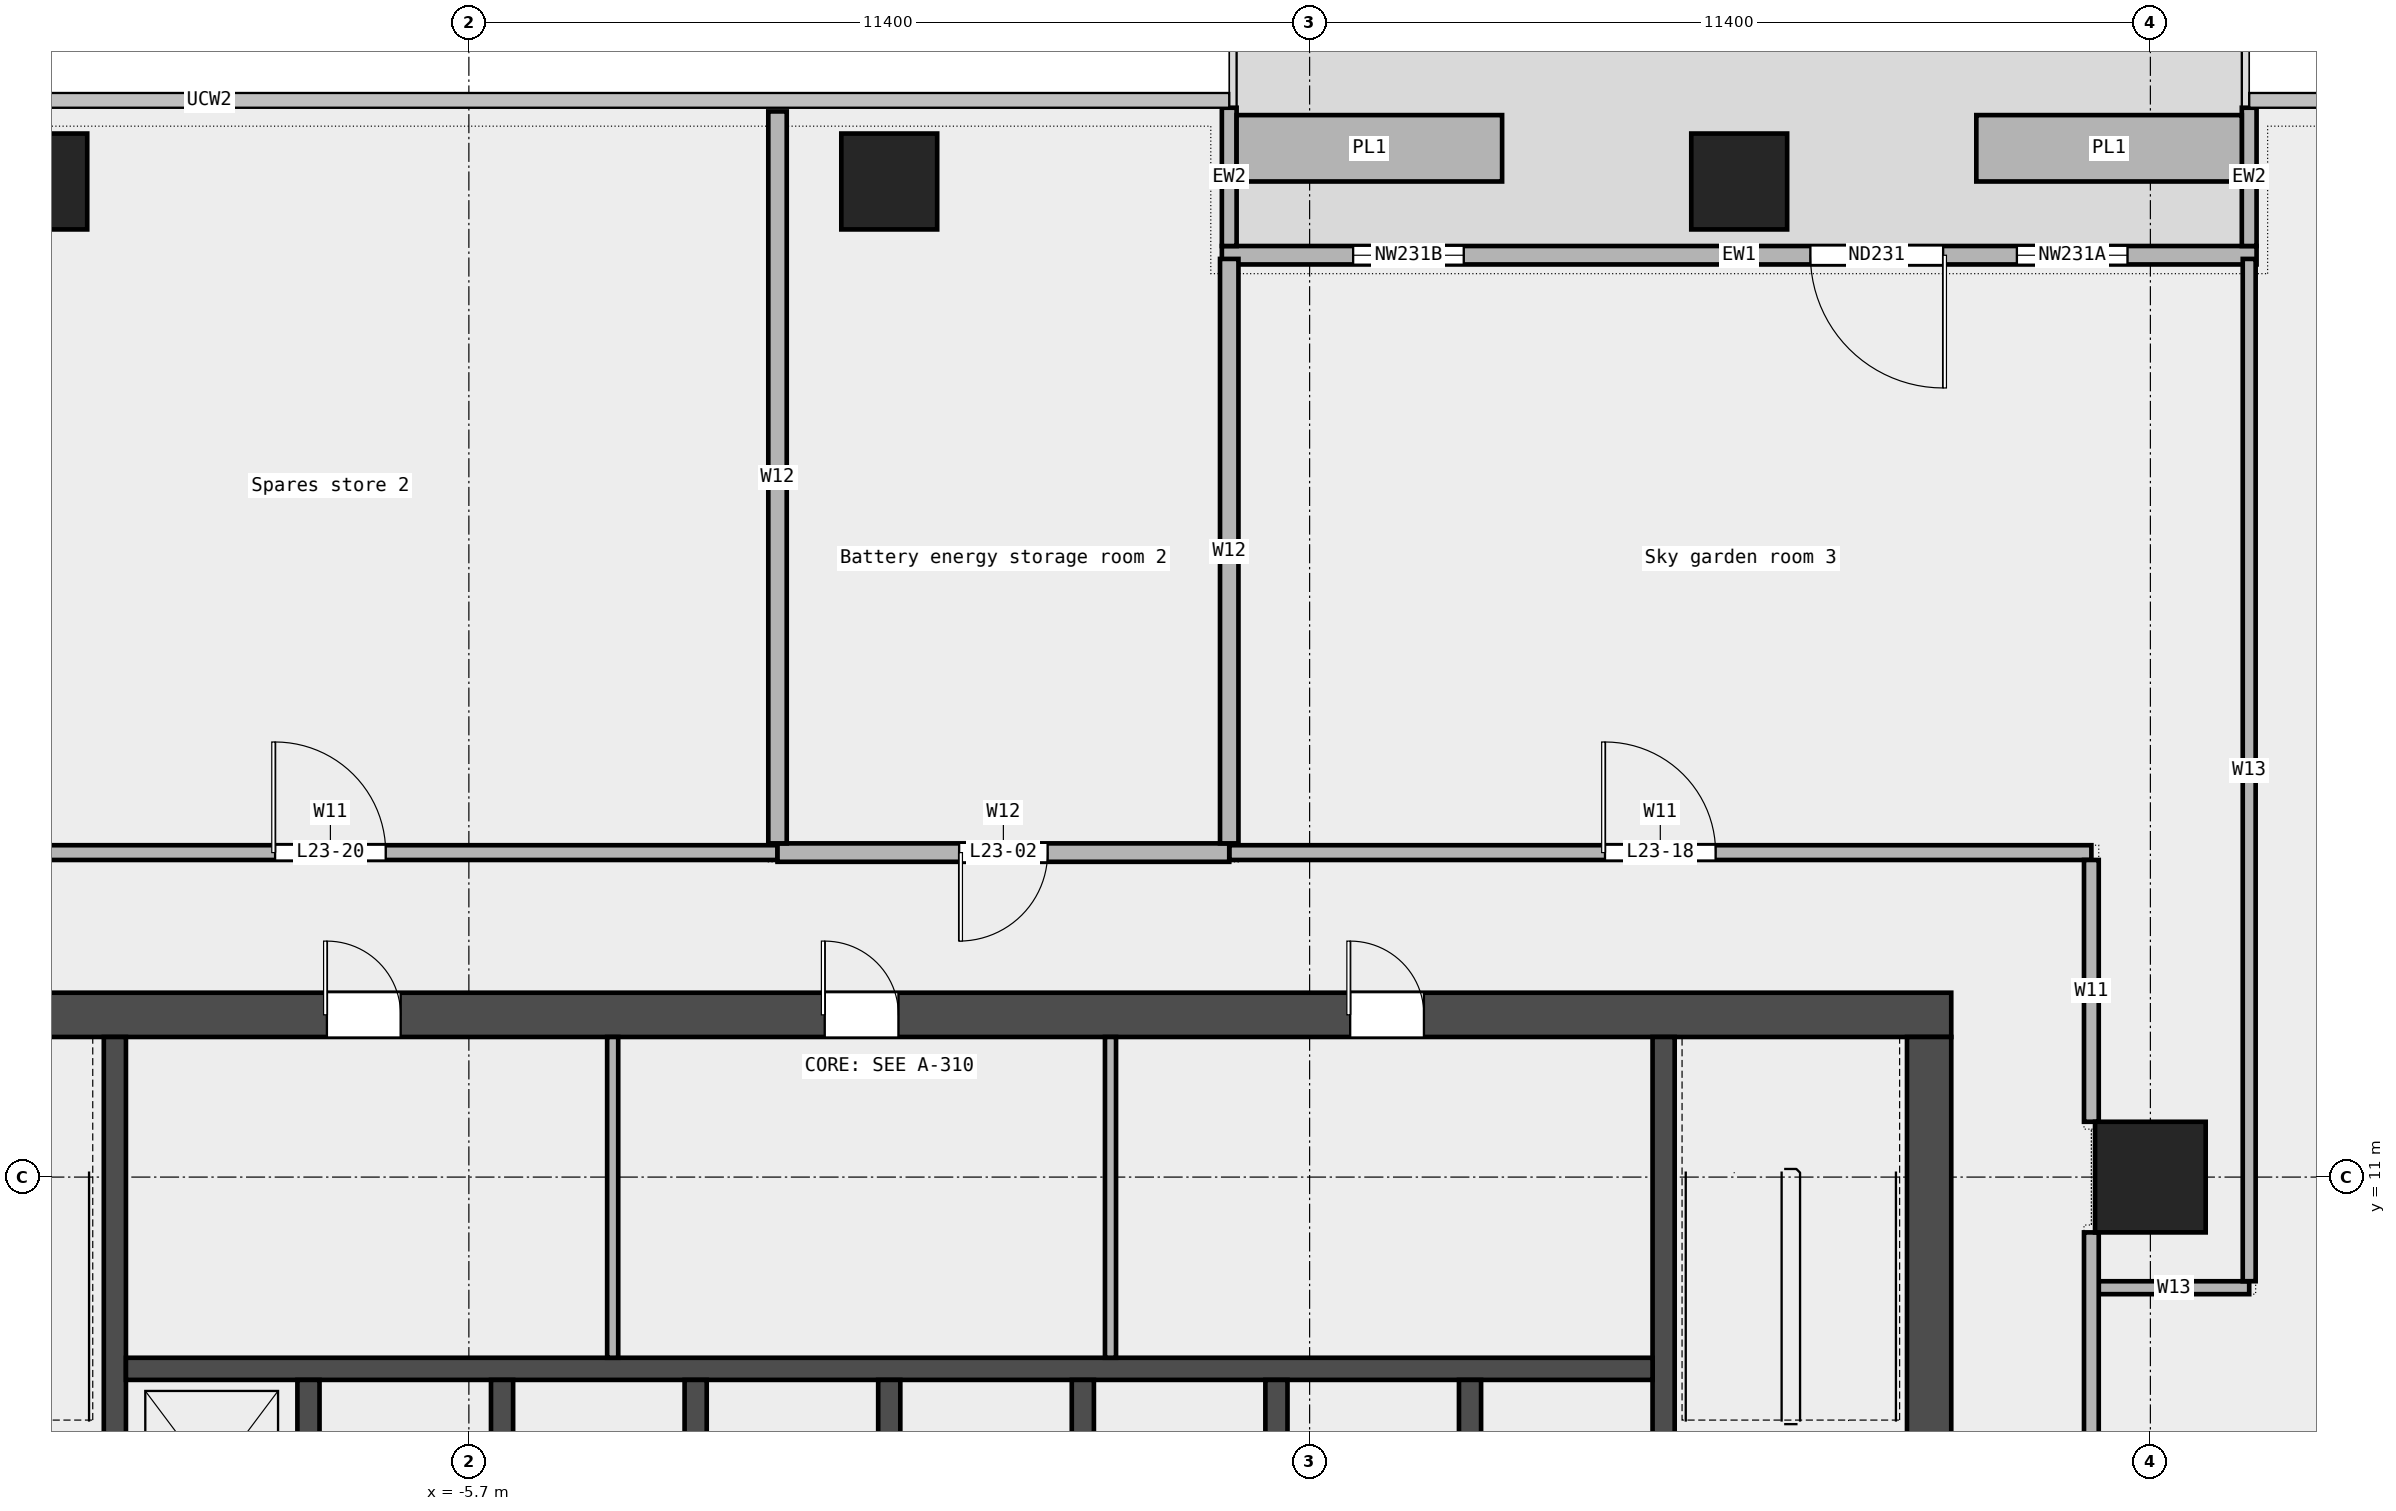
"""IFC4 building model, lengths in metres.
Left out: names, types, materials, properties, quantities, classifications, styles, units other than length and angle.
Written with IfcOpenShell. Run it as: python <this file> out.ifc"""

import sys

from ifc_helpers import new_model, si_unit, direction, frame, frame_2d, origin, origin_2d, place, context, subcontext, project, spatial, rectangle, extrude, element, fill, save


model = new_model("IFC4")
c1 = context("Model", 3, precision=1e-05, world=origin(), true_north=direction((0.0, 1.0)))
c2 = subcontext(c1, "Body", "Model", "MODEL_VIEW")
j1 = project(units=[si_unit("LENGTHUNIT", "METRE"), si_unit("PLANEANGLEUNIT", "RADIAN")], contexts=[c1])
p1 = place(None, origin())
s1 = spatial("IfcSite", under=j1, at=p1, CompositionType="ELEMENT")
p2 = place(p1, origin())
s2 = spatial("IfcBuilding", under=s1, at=p2, CompositionType="ELEMENT")
p3 = place(p2, frame((0.0, 0.0, 117.1)))
s3 = spatial("IfcBuildingStorey", under=s2, at=p3, CompositionType="ELEMENT", Elevation=117.1)
for number, where, z_axis, x_axis in (
    (1, (11.525, 24.5, 0.0), (0.0, 0.0, 1.0), (1.0, 0.0, 0.0)),
    (2, (0.0, 24.5, 0.0), (0.0, 0.0, 1.0), (1.0, 0.0, 0.0)),
    (3, (-11.525, 24.5, 0.0), (0.0, 0.0, 1.0), (1.0, 0.0, 0.0)),
):
    element("IfcColumn", number, at=place(p3, frame(where, z_axis=z_axis, x_axis=x_axis)), inside=s3, PredefinedType="COLUMN", context=c2, shape_type="SweptSolid", body=[
        extrude(rectangle(XDim=1.3, YDim=1.3, at=origin_2d()), origin(), (0.0, 0.0, 1.0), 4.05),
    ])
p4 = place(p3, frame((17.1, 11.0, 0.0), z_axis=(0.0, 0.0, 1.0), x_axis=(1.0, 0.0, 0.0)))
e4 = element("IfcColumn", 4, at=p4, inside=s3, PredefinedType="COLUMN", context=c2, shape_type="SweptSolid", body=[
    extrude(rectangle(XDim=1.5, YDim=1.5, at=origin_2d()), origin(), (0.0, 0.0, 1.0), 4.05),
])
p5 = place(p3, frame((18.54, 23.5, 0.0), z_axis=(0.0, 0.0, 1.0), x_axis=(-1.0, 0.0, 0.0)))
e5 = element("IfcWall", 5, at=p5, inside=s3, PredefinedType="STANDARD", context=c2, shape_type="SweptSolid", body=[
    extrude(rectangle(XDim=14.03, YDim=0.25, at=frame_2d((7.015, 0.0))), origin(), (0.0, 0.0, 1.0), 4.05),
])
p6 = place(p5, frame((1.75, 0.0, 0.45)))
e6 = element("IfcOpeningElement", 6, at=p6, cuts=e5, PredefinedType="OPENING", context=c2, shape_type="SweptSolid", body=[
    extrude(rectangle(XDim=1.5, YDim=3.0, at=frame_2d((0.75, 1.5))), frame((0.0, 0.137, 0.0), z_axis=(0.0, -1.0, 0.0), x_axis=(1.0, 0.0, 0.0)), (0.0, 0.0, 1.0), 0.274),
])
p7 = place(p5, frame((4.25, 0.0, 0.0)))
e7 = element("IfcOpeningElement", 7, at=p7, cuts=e5, PredefinedType="OPENING", context=c2, shape_type="SweptSolid", body=[
    extrude(rectangle(XDim=1.8, YDim=2.4, at=frame_2d((0.9, 1.2))), frame((0.0, 0.137, 0.0), z_axis=(0.0, -1.0, 0.0), x_axis=(1.0, 0.0, 0.0)), (0.0, 0.0, 1.0), 0.274),
])
p8 = place(p5, frame((10.75, 0.0, 0.45)))
e8 = element("IfcOpeningElement", 8, at=p8, cuts=e5, PredefinedType="OPENING", context=c2, shape_type="SweptSolid", body=[
    extrude(rectangle(XDim=1.5, YDim=3.0, at=frame_2d((0.75, 1.5))), frame((0.0, 0.137, 0.0), z_axis=(0.0, -1.0, 0.0), x_axis=(1.0, 0.0, 0.0)), (0.0, 0.0, 1.0), 0.274),
])
for number, where, z_axis, x_axis in (
    (9, (18.44, 25.5, 0.0), (0.0, 0.0, 1.0), (0.0, -1.0, 0.0)),
    (10, (4.61, 25.5, 0.0), (0.0, 0.0, 1.0), (0.0, -1.0, 0.0)),
):
    element("IfcWall", number, at=place(p3, frame(where, z_axis=z_axis, x_axis=x_axis)), inside=s3, PredefinedType="STANDARD", context=c2, shape_type="SweptSolid", body=[
        extrude(rectangle(XDim=1.875, YDim=0.2, at=frame_2d((0.938, 0.0))), origin(), (0.0, 0.0, 1.0), 4.05),
    ])
for number, where, z_axis, x_axis in (
    (11, (18.34, 24.95, 0.0), (0.0, 0.0, 1.0), (-1.0, 0.0, 0.0)),
    (12, (8.31, 24.95, 0.0), (0.0, 0.0, 1.0), (-1.0, 0.0, 0.0)),
):
    element("IfcWall", number, at=place(p3, frame(where, z_axis=z_axis, x_axis=x_axis)), inside=s3, PredefinedType="STANDARD", context=c2, shape_type="SweptSolid", body=[
        extrude(rectangle(XDim=3.6, YDim=0.9, at=frame_2d((1.8, 0.0))), origin(), (0.0, 0.0, 1.0), 0.7),
    ])
p9 = place(p3, frame((16.4, 9.5, 0.0), z_axis=(0.0, 0.0, 1.0), x_axis=(1.0, 0.0, 0.0)))
e13 = element("IfcWall", 13, at=p9, inside=s3, PredefinedType="PARTITIONING", context=c2, shape_type="SweptSolid", body=[
    extrude(rectangle(XDim=2.04, YDim=0.175, at=frame_2d((1.02, 0.0))), origin(), (0.0, 0.0, 1.0), 4.05),
])
p10 = place(p3, frame((-13.64, 15.4, 0.0), z_axis=(0.0, 0.0, 1.0), x_axis=(1.0, 0.0, 0.0)))
e14 = element("IfcWall", 14, at=p10, inside=s3, PredefinedType="PARTITIONING", context=c2, shape_type="SweptSolid", body=[
    extrude(rectangle(XDim=12.125, YDim=0.2, at=frame_2d((6.062, 0.0))), origin(), (0.0, 0.0, 1.0), 4.05),
])
p11 = place(p10, frame((5.312, 0.0, 0.0)))
e15 = element("IfcOpeningElement", 15, at=p11, cuts=e14, PredefinedType="OPENING", context=c2, shape_type="SweptSolid", body=[
    extrude(rectangle(XDim=1.5, YDim=2.1, at=frame_2d((0.75, 1.05))), frame((0.0, 0.112, 0.0), z_axis=(0.0, -1.0, 0.0), x_axis=(1.0, 0.0, 0.0)), (0.0, 0.0, 1.0), 0.224),
])
p12 = place(p3, frame((4.61, 15.4, 0.0), z_axis=(0.0, 0.0, 1.0), x_axis=(1.0, 0.0, 0.0)))
e16 = element("IfcWall", 16, at=p12, inside=s3, PredefinedType="PARTITIONING", context=c2, shape_type="SweptSolid", body=[
    extrude(rectangle(XDim=11.69, YDim=0.2, at=frame_2d((5.845, 0.0))), origin(), (0.0, 0.0, 1.0), 4.05),
])
p13 = place(p12, frame((5.095, 0.0, 0.0)))
e17 = element("IfcOpeningElement", 17, at=p13, cuts=e16, PredefinedType="OPENING", context=c2, shape_type="SweptSolid", body=[
    extrude(rectangle(XDim=1.5, YDim=2.1, at=frame_2d((0.75, 1.05))), frame((0.0, 0.112, 0.0), z_axis=(0.0, -1.0, 0.0), x_axis=(1.0, 0.0, 0.0)), (0.0, 0.0, 1.0), 0.224),
])
p14 = place(p3, frame((-1.515, 15.4, 0.0), z_axis=(0.0, 0.0, 1.0), x_axis=(1.0, 0.0, 0.0)))
e18 = element("IfcWall", 18, at=p14, inside=s3, PredefinedType="PARTITIONING", context=c2, shape_type="SweptSolid", body=[
    extrude(rectangle(XDim=6.125, YDim=0.25, at=frame_2d((3.062, 0.0))), origin(), (0.0, 0.0, 1.0), 4.05),
])
p15 = place(p14, frame((2.462, 0.0, 0.0)))
e19 = element("IfcOpeningElement", 19, at=p15, cuts=e18, PredefinedType="OPENING", context=c2, shape_type="SweptSolid", body=[
    extrude(rectangle(XDim=1.2, YDim=2.1, at=frame_2d((0.6, 1.05))), frame((0.0, 0.137, 0.0), z_axis=(0.0, -1.0, 0.0), x_axis=(1.0, 0.0, 0.0)), (0.0, 0.0, 1.0), 0.274),
])
p16 = place(p3, frame((-1.515, 15.525, 0.0), z_axis=(0.0, 0.0, 1.0), x_axis=(0.0, 1.0, 0.0)))
e20 = element("IfcWall", 20, at=p16, inside=s3, PredefinedType="PARTITIONING", context=c2, shape_type="SweptSolid", body=[
    extrude(rectangle(XDim=9.925, YDim=0.25, at=frame_2d((4.962, 0.0))), origin(), (0.0, 0.0, 1.0), 4.05),
])
p17 = place(p3, frame((4.61, 15.525, 0.0), z_axis=(0.0, 0.0, 1.0), x_axis=(0.0, 1.0, 0.0)))
e21 = element("IfcWall", 21, at=p17, inside=s3, PredefinedType="PARTITIONING", context=c2, shape_type="SweptSolid", body=[
    extrude(rectangle(XDim=7.925, YDim=0.25, at=frame_2d((3.962, 0.0))), origin(), (0.0, 0.0, 1.0), 4.05),
])
p18 = place(p3, frame((16.3, 1.325, 0.0), z_axis=(0.0, 0.0, 1.0), x_axis=(0.0, 1.0, 0.0)))
e22 = element("IfcWall", 22, at=p18, inside=s3, PredefinedType="PARTITIONING", context=c2, shape_type="SweptSolid", body=[
    extrude(rectangle(XDim=8.925, YDim=0.2, at=frame_2d((4.462, 0.0))), origin(), (0.0, 0.0, 1.0), 4.05),
])
p19 = place(p18, frame((3.188, 0.0, 0.0)))
e23 = element("IfcOpeningElement", 23, at=p19, cuts=e22, PredefinedType="OPENING", context=c2, shape_type="SweptSolid", body=[
    extrude(rectangle(XDim=1.8, YDim=2.1, at=frame_2d((0.9, 1.05))), frame((0.0, 0.112, 0.0), z_axis=(0.0, -1.0, 0.0), x_axis=(1.0, 0.0, 0.0)), (0.0, 0.0, 1.0), 0.224),
])
p20 = place(p3, frame((16.3, 11.75, 0.0), z_axis=(0.0, 0.0, 1.0), x_axis=(0.0, 1.0, 0.0)))
e24 = element("IfcWall", 24, at=p20, inside=s3, PredefinedType="PARTITIONING", context=c2, shape_type="SweptSolid", body=[
    extrude(rectangle(XDim=3.55, YDim=0.2, at=frame_2d((1.775, 0.0))), origin(), (0.0, 0.0, 1.0), 4.05),
])
p21 = place(p3, frame((18.44, 9.588, 0.0), z_axis=(0.0, 0.0, 1.0), x_axis=(0.0, 1.0, 0.0)))
e25 = element("IfcWall", 25, at=p21, inside=s3, PredefinedType="PARTITIONING", context=c2, shape_type="SweptSolid", body=[
    extrude(rectangle(XDim=13.862, YDim=0.175, at=frame_2d((6.931, 0.0))), origin(), (0.0, 0.0, 1.0), 4.05),
])
p22 = place(p3, frame((-14.4, 13.2, 0.0), z_axis=(0.0, 0.0, 1.0), x_axis=(1.0, 0.0, 0.0)))
e26 = element("IfcWall", 26, at=p22, inside=s3, PredefinedType="SHEAR", context=c2, shape_type="SweptSolid", body=[
    extrude(rectangle(XDim=28.8, YDim=0.6, at=frame_2d((14.4, 0.0))), origin(), (0.0, 0.0, 1.0), 4.2),
])
p23 = place(p22, frame((6.775, 0.0, 0.0)))
e27 = element("IfcOpeningElement", 27, at=p23, cuts=e26, PredefinedType="OPENING", context=c2, shape_type="SweptSolid", body=[
    extrude(rectangle(XDim=1.0, YDim=2.1, at=frame_2d((0.5, 1.05))), frame((0.0, 0.312, 0.0), z_axis=(0.0, -1.0, 0.0), x_axis=(1.0, 0.0, 0.0)), (0.0, 0.0, 1.0), 0.624),
])
p24 = place(p22, frame((13.525, 0.0, 0.0)))
e28 = element("IfcOpeningElement", 28, at=p24, cuts=e26, PredefinedType="OPENING", context=c2, shape_type="SweptSolid", body=[
    extrude(rectangle(XDim=1.0, YDim=2.1, at=frame_2d((0.5, 1.05))), frame((0.0, 0.312, 0.0), z_axis=(0.0, -1.0, 0.0), x_axis=(1.0, 0.0, 0.0)), (0.0, 0.0, 1.0), 0.624),
])
p25 = place(p22, frame((20.65, 0.0, 0.0)))
e29 = element("IfcOpeningElement", 29, at=p25, cuts=e26, PredefinedType="OPENING", context=c2, shape_type="SweptSolid", body=[
    extrude(rectangle(XDim=1.0, YDim=2.1, at=frame_2d((0.5, 1.05))), frame((0.0, 0.312, 0.0), z_axis=(0.0, -1.0, 0.0), x_axis=(1.0, 0.0, 0.0)), (0.0, 0.0, 1.0), 0.624),
])
p26 = place(p3, frame((14.1, -6.6, 0.0), z_axis=(0.0, 0.0, 1.0), x_axis=(0.0, 1.0, 0.0)))
e30 = element("IfcWall", 30, at=p26, inside=s3, PredefinedType="SHEAR", context=c2, shape_type="SweptSolid", body=[
    extrude(rectangle(XDim=19.5, YDim=0.6, at=frame_2d((9.75, 0.0))), origin(), (0.0, 0.0, 1.0), 4.2),
])
p27 = place(p26, frame((9.3, 0.0, 0.0)))
e31 = element("IfcOpeningElement", 31, at=p27, cuts=e30, PredefinedType="OPENING", context=c2, shape_type="SweptSolid", body=[
    extrude(rectangle(XDim=1.8, YDim=2.1, at=frame_2d((0.9, 1.05))), frame((0.0, 0.312, 0.0), z_axis=(0.0, -1.0, 0.0), x_axis=(1.0, 0.0, 0.0)), (0.0, 0.0, 1.0), 0.624),
])
for number, where, z_axis, x_axis in (
    (32, (-10.5, 5.25, 0.0), (0.0, 0.0, 1.0), (0.0, 1.0, 0.0)),
    (33, (10.5, 5.25, 0.0), (0.0, 0.0, 1.0), (0.0, 1.0, 0.0)),
):
    element("IfcWall", number, at=place(p3, frame(where, z_axis=z_axis, x_axis=x_axis)), inside=s3, PredefinedType="SHEAR", context=c2, shape_type="SweptSolid", body=[
        extrude(rectangle(XDim=7.65, YDim=0.3, at=frame_2d((3.825, 0.0))), origin(), (0.0, 0.0, 1.0), 4.2),
    ])
p28 = place(p3, frame((-10.35, 8.4, 0.0), z_axis=(0.0, 0.0, 1.0), x_axis=(1.0, 0.0, 0.0)))
e34 = element("IfcWall", 34, at=p28, inside=s3, PredefinedType="SOLIDWALL", context=c2, shape_type="SweptSolid", body=[
    extrude(rectangle(XDim=20.7, YDim=0.3, at=frame_2d((10.35, 0.0))), origin(), (0.0, 0.0, 1.0), 4.2),
])
for number, where, z_axis, x_axis in (
    (35, (-7.875, 5.55, 0.0), (0.0, 0.0, 1.0), (0.0, 1.0, 0.0)),
    (36, (-5.25, 5.55, 0.0), (0.0, 0.0, 1.0), (0.0, 1.0, 0.0)),
    (37, (-2.625, 5.55, 0.0), (0.0, 0.0, 1.0), (0.0, 1.0, 0.0)),
    (38, (0.0, 5.55, 0.0), (0.0, 0.0, 1.0), (0.0, 1.0, 0.0)),
    (39, (2.625, 5.55, 0.0), (0.0, 0.0, 1.0), (0.0, 1.0, 0.0)),
    (40, (5.25, 5.55, 0.0), (0.0, 0.0, 1.0), (0.0, 1.0, 0.0)),
    (41, (7.875, 5.55, 0.0), (0.0, 0.0, 1.0), (0.0, 1.0, 0.0)),
):
    element("IfcWall", number, at=place(p3, frame(where, z_axis=z_axis, x_axis=x_axis)), inside=s3, PredefinedType="SOLIDWALL", context=c2, shape_type="SweptSolid", body=[
        extrude(rectangle(XDim=2.7, YDim=0.3, at=frame_2d((1.35, 0.0))), origin(), (0.0, 0.0, 1.0), 4.2),
    ])
for number, where, z_axis, x_axis in (
    (42, (-3.75, 8.55, 0.0), (0.0, 0.0, 1.0), (0.0, 1.0, 0.0)),
    (43, (3.0, 8.55, 0.0), (0.0, 0.0, 1.0), (0.0, 1.0, 0.0)),
):
    element("IfcWall", number, at=place(p3, frame(where, z_axis=z_axis, x_axis=x_axis)), inside=s3, PredefinedType="PARTITIONING", context=c2, shape_type="SweptSolid", body=[
        extrude(rectangle(XDim=4.35, YDim=0.15, at=frame_2d((2.175, 0.0))), origin(), (0.0, 0.0, 1.0), 4.2),
    ])
p29 = place(p6, origin())
e44 = element("IfcWindow", 44, at=p29, inside=s3, PartitioningType="SINGLE_PANEL", PredefinedType="WINDOW", context=c2, shape_type="SweptSolid", body=[
    extrude(rectangle(XDim=1.5, YDim=3.0, at=frame_2d((0.75, 1.5))), frame((0.0, 0.03, 0.0), z_axis=(0.0, -1.0, 0.0), x_axis=(1.0, 0.0, 0.0)), (0.0, 0.0, 1.0), 0.06),
])
fill(e6, e44)
p30 = place(p7, origin())
e45 = element("IfcDoor", 45, at=p30, inside=s3, OperationType="DOUBLE_DOOR_SINGLE_SWING", PredefinedType="DOOR", context=c2, shape_type="SweptSolid", body=[
    extrude(rectangle(XDim=1.8, YDim=2.4, at=frame_2d((0.9, 1.2))), frame((0.0, 0.025, 0.0), z_axis=(0.0, -1.0, 0.0), x_axis=(1.0, 0.0, 0.0)), (0.0, 0.0, 1.0), 0.05),
])
fill(e7, e45)
p31 = place(p8, origin())
e46 = element("IfcWindow", 46, at=p31, inside=s3, PartitioningType="SINGLE_PANEL", PredefinedType="WINDOW", context=c2, shape_type="SweptSolid", body=[
    extrude(rectangle(XDim=1.5, YDim=3.0, at=frame_2d((0.75, 1.5))), frame((0.0, 0.03, 0.0), z_axis=(0.0, -1.0, 0.0), x_axis=(1.0, 0.0, 0.0)), (0.0, 0.0, 1.0), 0.06),
])
fill(e8, e46)
p32 = place(p15, origin())
e47 = element("IfcDoor", 47, at=p32, inside=s3, OperationType="SINGLE_SWING_RIGHT", PredefinedType="DOOR", context=c2, shape_type="SweptSolid", body=[
    extrude(rectangle(XDim=1.2, YDim=2.1, at=frame_2d((0.6, 1.05))), frame((0.0, 0.025, 0.0), z_axis=(0.0, -1.0, 0.0), x_axis=(1.0, 0.0, 0.0)), (0.0, 0.0, 1.0), 0.05),
])
fill(e19, e47)
p33 = place(p13, origin())
e48 = element("IfcDoor", 48, at=p33, inside=s3, OperationType="DOUBLE_DOOR_SINGLE_SWING", PredefinedType="DOOR", context=c2, shape_type="SweptSolid", body=[
    extrude(rectangle(XDim=1.5, YDim=2.1, at=frame_2d((0.75, 1.05))), frame((0.0, 0.025, 0.0), z_axis=(0.0, -1.0, 0.0), x_axis=(1.0, 0.0, 0.0)), (0.0, 0.0, 1.0), 0.05),
])
fill(e17, e48)
p34 = place(p11, origin())
e49 = element("IfcDoor", 49, at=p34, inside=s3, OperationType="DOUBLE_DOOR_SINGLE_SWING", PredefinedType="DOOR", context=c2, shape_type="SweptSolid", body=[
    extrude(rectangle(XDim=1.5, YDim=2.1, at=frame_2d((0.75, 1.05))), frame((0.0, 0.025, 0.0), z_axis=(0.0, -1.0, 0.0), x_axis=(1.0, 0.0, 0.0)), (0.0, 0.0, 1.0), 0.05),
])
fill(e15, e49)
p35 = place(p23, origin())
e50 = element("IfcDoor", 50, at=p35, inside=s3, OperationType="SINGLE_SWING_LEFT", PredefinedType="DOOR", context=c2, shape_type="SweptSolid", body=[
    extrude(rectangle(XDim=1.0, YDim=2.1, at=frame_2d((0.5, 1.05))), frame((0.0, 0.025, 0.0), z_axis=(0.0, -1.0, 0.0), x_axis=(1.0, 0.0, 0.0)), (0.0, 0.0, 1.0), 0.05),
])
fill(e27, e50)
p36 = place(p24, origin())
e51 = element("IfcDoor", 51, at=p36, inside=s3, OperationType="SINGLE_SWING_LEFT", PredefinedType="DOOR", context=c2, shape_type="SweptSolid", body=[
    extrude(rectangle(XDim=1.0, YDim=2.1, at=frame_2d((0.5, 1.05))), frame((0.0, 0.025, 0.0), z_axis=(0.0, -1.0, 0.0), x_axis=(1.0, 0.0, 0.0)), (0.0, 0.0, 1.0), 0.05),
])
fill(e28, e51)
p37 = place(p25, origin())
e52 = element("IfcDoor", 52, at=p37, inside=s3, OperationType="SINGLE_SWING_LEFT", PredefinedType="DOOR", context=c2, shape_type="SweptSolid", body=[
    extrude(rectangle(XDim=1.0, YDim=2.1, at=frame_2d((0.5, 1.05))), frame((0.0, 0.025, 0.0), z_axis=(0.0, -1.0, 0.0), x_axis=(1.0, 0.0, 0.0)), (0.0, 0.0, 1.0), 0.05),
])
fill(e29, e52)
save(model, sys.argv[1])
